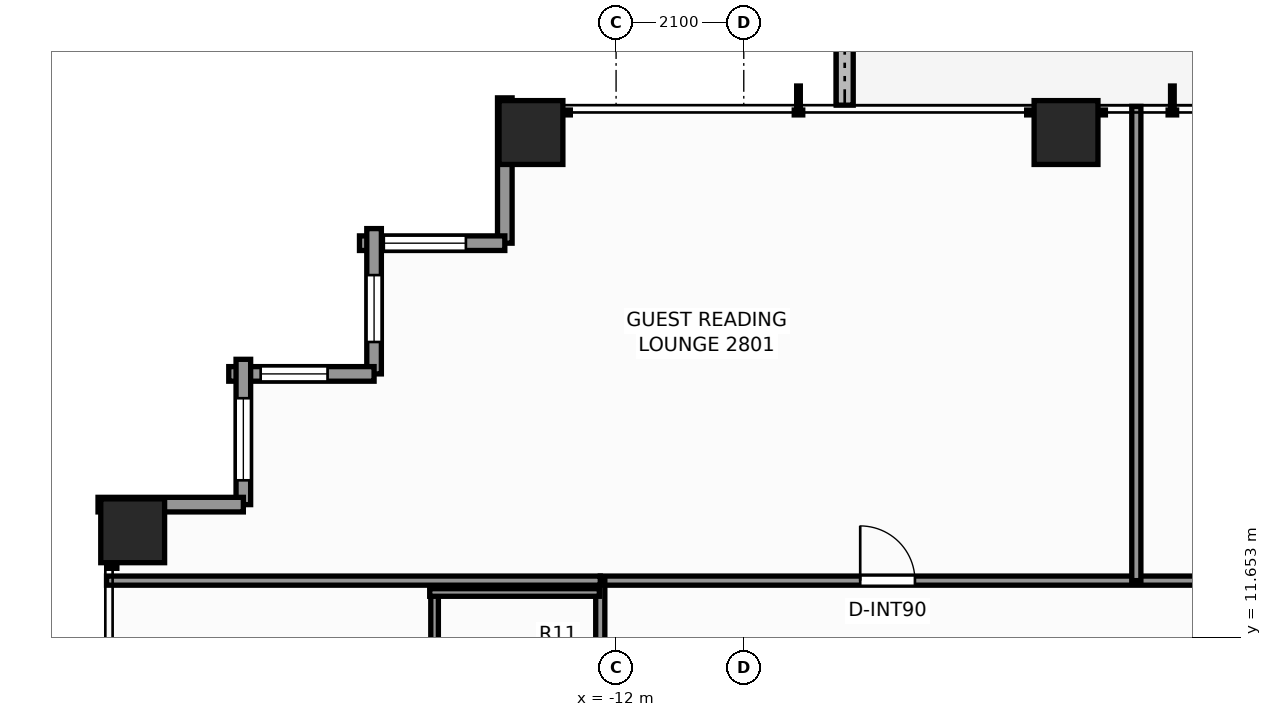
"""IFC4 building model, lengths in metres.
Left out: names, types, materials, properties, quantities, classifications, styles, units other than length and angle.
Written with IfcOpenShell. Run it as: python <this file> out.ifc"""

import sys

from ifc_helpers import new_model, si_unit, direction, frame, frame_2d, origin, origin_2d, place, context, subcontext, project, spatial, rectangle, extrude, element, fill, save


model = new_model("IFC4")
c1 = context("Model", 3, precision=1e-05, world=origin(), true_north=direction((0.0, 1.0)))
c2 = subcontext(c1, "Body", "Model", "MODEL_VIEW")
j1 = project(units=[si_unit("LENGTHUNIT", "METRE"), si_unit("PLANEANGLEUNIT", "RADIAN")], contexts=[c1])
p1 = place(None, origin())
s1 = spatial("IfcSite", under=j1, at=p1, CompositionType="ELEMENT")
p2 = place(p1, origin())
s2 = spatial("IfcBuilding", under=s1, at=p2, CompositionType="ELEMENT")
p3 = place(p2, frame((0.0, 0.0, 98.6)))
s3 = spatial("IfcBuildingStorey", under=s2, at=p3, CompositionType="ELEMENT", Elevation=98.6)
for number, where, z_axis, x_axis in (
    (1, (-13.4, 19.95, 0.0), (0.0, 0.0, 1.0), (1.0, 0.0, 0.0)),
    (2, (-4.6, 19.95, 0.0), (0.0, 0.0, 1.0), (1.0, 0.0, 0.0)),
    (3, (-19.95, 13.4, 0.0), (0.0, 0.0, 1.0), (1.0, 0.0, 0.0)),
):
    element("IfcColumn", number, at=place(p3, frame(where, z_axis=z_axis, x_axis=x_axis)), inside=s3, PredefinedType="COLUMN", context=c2, shape_type="SweptSolid", body=[
        extrude(rectangle(XDim=1.05, YDim=1.05, at=origin_2d()), origin(), (0.0, 0.0, 1.0), 3.3),
    ])
p4 = place(p3, frame((-8.24, 22.105, -0.04), z_axis=(0.0, 0.0, 1.0), x_axis=(0.0, -1.0, 0.0)))
e4 = element("IfcWall", 4, at=p4, inside=s3, PredefinedType="PARAPET", context=c2, shape_type="SweptSolid", body=[
    extrude(rectangle(XDim=1.705, YDim=0.28, at=frame_2d((0.853, 0.0))), origin(), (0.0, 0.0, 1.0), 0.42),
])
p5 = place(p3, frame((-13.83, 18.13, 0.0), z_axis=(0.0, 0.0, 1.0), x_axis=(0.0, 1.0, 0.0)))
e5 = element("IfcWall", 5, at=p5, inside=s3, PredefinedType="STANDARD", context=c2, shape_type="SweptSolid", body=[
    extrude(rectangle(XDim=2.39, YDim=0.24, at=frame_2d((1.195, 0.0))), origin(), (0.0, 0.0, 1.0), 2.459),
])
p6 = place(p3, frame((-16.22, 18.13, 0.0), z_axis=(0.0, 0.0, 1.0), x_axis=(1.0, 0.0, 0.0)))
e6 = element("IfcWall", 6, at=p6, inside=s3, PredefinedType="STANDARD", context=c2, shape_type="SweptSolid", body=[
    extrude(rectangle(XDim=2.39, YDim=0.24, at=frame_2d((1.195, 0.0))), origin(), (0.0, 0.0, 1.0), 2.459),
])
p7 = place(p6, frame((0.4, 0.0, 0.65)))
e7 = element("IfcOpeningElement", 7, at=p7, cuts=e6, PredefinedType="OPENING", context=c2, shape_type="SweptSolid", body=[
    extrude(rectangle(XDim=1.35, YDim=1.55, at=frame_2d((0.675, 0.775))), frame((0.0, 0.13, 0.0), z_axis=(0.0, -1.0, 0.0), x_axis=(1.0, 0.0, 0.0)), (0.0, 0.0, 1.0), 0.26),
])
p8 = place(p3, frame((-15.98, 15.98, 0.0), z_axis=(0.0, 0.0, 1.0), x_axis=(0.0, 1.0, 0.0)))
e8 = element("IfcWall", 8, at=p8, inside=s3, PredefinedType="STANDARD", context=c2, shape_type="SweptSolid", body=[
    extrude(rectangle(XDim=2.39, YDim=0.24, at=frame_2d((1.195, 0.0))), origin(), (0.0, 0.0, 1.0), 2.459),
])
p9 = place(p8, frame((0.525, 0.0, 0.65)))
e9 = element("IfcOpeningElement", 9, at=p9, cuts=e8, PredefinedType="OPENING", context=c2, shape_type="SweptSolid", body=[
    extrude(rectangle(XDim=1.1, YDim=1.45, at=frame_2d((0.55, 0.725))), frame((0.0, 0.13, 0.0), z_axis=(0.0, -1.0, 0.0), x_axis=(1.0, 0.0, 0.0)), (0.0, 0.0, 1.0), 0.26),
])
p10 = place(p3, frame((-18.37, 15.98, 0.0), z_axis=(0.0, 0.0, 1.0), x_axis=(1.0, 0.0, 0.0)))
e10 = element("IfcWall", 10, at=p10, inside=s3, PredefinedType="STANDARD", context=c2, shape_type="SweptSolid", body=[
    extrude(rectangle(XDim=2.39, YDim=0.24, at=frame_2d((1.195, 0.0))), origin(), (0.0, 0.0, 1.0), 2.459),
])
p11 = place(p10, frame((0.525, 0.0, 0.65)))
e11 = element("IfcOpeningElement", 11, at=p11, cuts=e10, PredefinedType="OPENING", context=c2, shape_type="SweptSolid", body=[
    extrude(rectangle(XDim=1.1, YDim=1.45, at=frame_2d((0.55, 0.725))), frame((0.0, 0.13, 0.0), z_axis=(0.0, -1.0, 0.0), x_axis=(1.0, 0.0, 0.0)), (0.0, 0.0, 1.0), 0.26),
])
p12 = place(p3, frame((-18.13, 13.83, 0.0), z_axis=(0.0, 0.0, 1.0), x_axis=(0.0, 1.0, 0.0)))
e12 = element("IfcWall", 12, at=p12, inside=s3, PredefinedType="STANDARD", context=c2, shape_type="SweptSolid", body=[
    extrude(rectangle(XDim=2.39, YDim=0.24, at=frame_2d((1.195, 0.0))), origin(), (0.0, 0.0, 1.0), 2.459),
])
p13 = place(p12, frame((0.4, 0.0, 0.65)))
e13 = element("IfcOpeningElement", 13, at=p13, cuts=e12, PredefinedType="OPENING", context=c2, shape_type="SweptSolid", body=[
    extrude(rectangle(XDim=1.35, YDim=1.55, at=frame_2d((0.675, 0.775))), frame((0.0, 0.13, 0.0), z_axis=(0.0, -1.0, 0.0), x_axis=(1.0, 0.0, 0.0)), (0.0, 0.0, 1.0), 0.26),
])
p14 = place(p3, frame((-20.52, 13.83, 0.0), z_axis=(0.0, 0.0, 1.0), x_axis=(1.0, 0.0, 0.0)))
e14 = element("IfcWall", 14, at=p14, inside=s3, PredefinedType="STANDARD", context=c2, shape_type="SweptSolid", body=[
    extrude(rectangle(XDim=2.39, YDim=0.24, at=frame_2d((1.195, 0.0))), origin(), (0.0, 0.0, 1.0), 2.459),
])
p15 = place(p3, frame((-12.26, 12.58, 0.0), z_axis=(0.0, 0.0, 1.0), x_axis=(1.0, 0.0, 0.0)))
e15 = element("IfcWall", 15, at=p15, inside=s3, PredefinedType="PARTITIONING", context=c2, shape_type="SweptSolid", body=[
    extrude(rectangle(XDim=24.52, YDim=0.15, at=frame_2d((12.26, 0.0))), origin(), (0.0, 0.0, 1.0), 2.292),
])
p16 = place(p15, frame((4.275, 0.0, 0.0)))
e16 = element("IfcOpeningElement", 16, at=p16, cuts=e15, PredefinedType="OPENING", context=c2, shape_type="SweptSolid", body=[
    extrude(rectangle(XDim=0.9, YDim=2.06, at=frame_2d((0.45, 1.03))), frame((0.0, 0.085, 0.0), z_axis=(0.0, -1.0, 0.0), x_axis=(1.0, 0.0, 0.0)), (0.0, 0.0, 1.0), 0.17),
])
p17 = place(p15, frame((13.84, 0.0, 0.0)))
e17 = element("IfcOpeningElement", 17, at=p17, cuts=e15, PredefinedType="OPENING", context=c2, shape_type="SweptSolid", body=[
    extrude(rectangle(XDim=0.9, YDim=2.06, at=frame_2d((0.45, 1.03))), frame((0.0, 0.085, 0.0), z_axis=(0.0, -1.0, 0.0), x_axis=(1.0, 0.0, 0.0)), (0.0, 0.0, 1.0), 0.17),
])
p18 = place(p15, frame((19.345, 0.0, 0.0)))
e18 = element("IfcOpeningElement", 18, at=p18, cuts=e15, PredefinedType="OPENING", context=c2, shape_type="SweptSolid", body=[
    extrude(rectangle(XDim=0.9, YDim=2.06, at=frame_2d((0.45, 1.03))), frame((0.0, 0.085, 0.0), z_axis=(0.0, -1.0, 0.0), x_axis=(1.0, 0.0, 0.0)), (0.0, 0.0, 1.0), 0.17),
])
p19 = place(p3, frame((-12.26, 7.4, 0.0), z_axis=(0.0, 0.0, 1.0), x_axis=(0.0, 1.0, 0.0)))
e19 = element("IfcWall", 19, at=p19, inside=s3, PredefinedType="PARTITIONING", context=c2, shape_type="SweptSolid", body=[
    extrude(rectangle(XDim=5.18, YDim=0.15, at=frame_2d((2.59, 0.0))), origin(), (0.0, 0.0, 1.0), 2.292),
])
p20 = place(p19, frame((0.787, 0.0, 0.0)))
e20 = element("IfcOpeningElement", 20, at=p20, cuts=e19, PredefinedType="OPENING", context=c2, shape_type="SweptSolid", body=[
    extrude(rectangle(XDim=0.95, YDim=2.06, at=frame_2d((0.475, 1.03))), frame((0.0, 0.085, 0.0), z_axis=(0.0, -1.0, 0.0), x_axis=(1.0, 0.0, 0.0)), (0.0, 0.0, 1.0), 0.17),
])
p21 = place(p3, frame((-20.38, 12.58, 0.0), z_axis=(0.0, 0.0, 1.0), x_axis=(1.0, 0.0, 0.0)))
e21 = element("IfcWall", 21, at=p21, inside=s3, PredefinedType="PARTITIONING", context=c2, shape_type="SweptSolid", body=[
    extrude(rectangle(XDim=8.12, YDim=0.15, at=frame_2d((4.06, 0.0))), origin(), (0.0, 0.0, 1.0), 2.292),
])
p22 = place(p3, frame((-3.444, 12.58, 0.0), z_axis=(0.0, 0.0, 1.0), x_axis=(0.0, 1.0, 0.0)))
e22 = element("IfcWall", 22, at=p22, inside=s3, PredefinedType="PARTITIONING", context=c2, shape_type="SweptSolid", body=[
    extrude(rectangle(XDim=7.8, YDim=0.15, at=frame_2d((3.9, 0.0))), origin(), (0.0, 0.0, 1.0), 2.449),
])
p23 = place(p3, frame((-14.985, 10.075, 0.0), z_axis=(0.0, 0.0, 1.0), x_axis=(0.0, 1.0, 0.0)))
e23 = element("IfcWall", 23, at=p23, inside=s3, PredefinedType="PARTITIONING", context=c2, shape_type="SweptSolid", body=[
    extrude(rectangle(XDim=2.37, YDim=0.125, at=frame_2d((1.185, 0.0))), origin(), (0.0, 0.0, 1.0), 2.292),
])
p24 = place(p3, frame((-15.065, 12.385, 0.0), z_axis=(0.0, 0.0, 1.0), x_axis=(1.0, 0.0, 0.0)))
e24 = element("IfcWall", 24, at=p24, inside=s3, PredefinedType="PARTITIONING", context=c2, shape_type="SweptSolid", body=[
    extrude(rectangle(XDim=2.79, YDim=0.125, at=frame_2d((1.395, 0.0))), origin(), (0.0, 0.0, 1.0), 3.08),
])
p25 = place(p7, origin())
e25 = element("IfcWindow", 25, at=p25, inside=s3, PartitioningType="SINGLE_PANEL", PredefinedType="WINDOW", context=c2, shape_type="SweptSolid", body=[
    extrude(rectangle(XDim=1.35, YDim=1.55, at=frame_2d((0.675, 0.775))), frame((0.0, 0.03, 0.0), z_axis=(0.0, -1.0, 0.0), x_axis=(1.0, 0.0, 0.0)), (0.0, 0.0, 1.0), 0.06),
])
fill(e7, e25)
p26 = place(p9, origin())
e26 = element("IfcWindow", 26, at=p26, inside=s3, PartitioningType="SINGLE_PANEL", PredefinedType="WINDOW", context=c2, shape_type="SweptSolid", body=[
    extrude(rectangle(XDim=1.1, YDim=1.45, at=frame_2d((0.55, 0.725))), frame((0.0, 0.03, 0.0), z_axis=(0.0, -1.0, 0.0), x_axis=(1.0, 0.0, 0.0)), (0.0, 0.0, 1.0), 0.06),
])
fill(e9, e26)
p27 = place(p11, origin())
e27 = element("IfcWindow", 27, at=p27, inside=s3, PartitioningType="SINGLE_PANEL", PredefinedType="WINDOW", context=c2, shape_type="SweptSolid", body=[
    extrude(rectangle(XDim=1.1, YDim=1.45, at=frame_2d((0.55, 0.725))), frame((0.0, 0.03, 0.0), z_axis=(0.0, -1.0, 0.0), x_axis=(1.0, 0.0, 0.0)), (0.0, 0.0, 1.0), 0.06),
])
fill(e11, e27)
p28 = place(p13, origin())
e28 = element("IfcWindow", 28, at=p28, inside=s3, PartitioningType="SINGLE_PANEL", PredefinedType="WINDOW", context=c2, shape_type="SweptSolid", body=[
    extrude(rectangle(XDim=1.35, YDim=1.55, at=frame_2d((0.675, 0.775))), frame((0.0, 0.03, 0.0), z_axis=(0.0, -1.0, 0.0), x_axis=(1.0, 0.0, 0.0)), (0.0, 0.0, 1.0), 0.06),
])
fill(e13, e28)
p29 = place(p16, origin())
e29 = element("IfcDoor", 29, at=p29, inside=s3, OperationType="SINGLE_SWING_LEFT", PredefinedType="DOOR", context=c2, shape_type="SweptSolid", body=[
    extrude(rectangle(XDim=0.9, YDim=2.06, at=frame_2d((0.45, 1.03))), frame((0.0, 0.025, 0.0), z_axis=(0.0, -1.0, 0.0), x_axis=(1.0, 0.0, 0.0)), (0.0, 0.0, 1.0), 0.05),
])
fill(e16, e29)
save(model, sys.argv[1])
